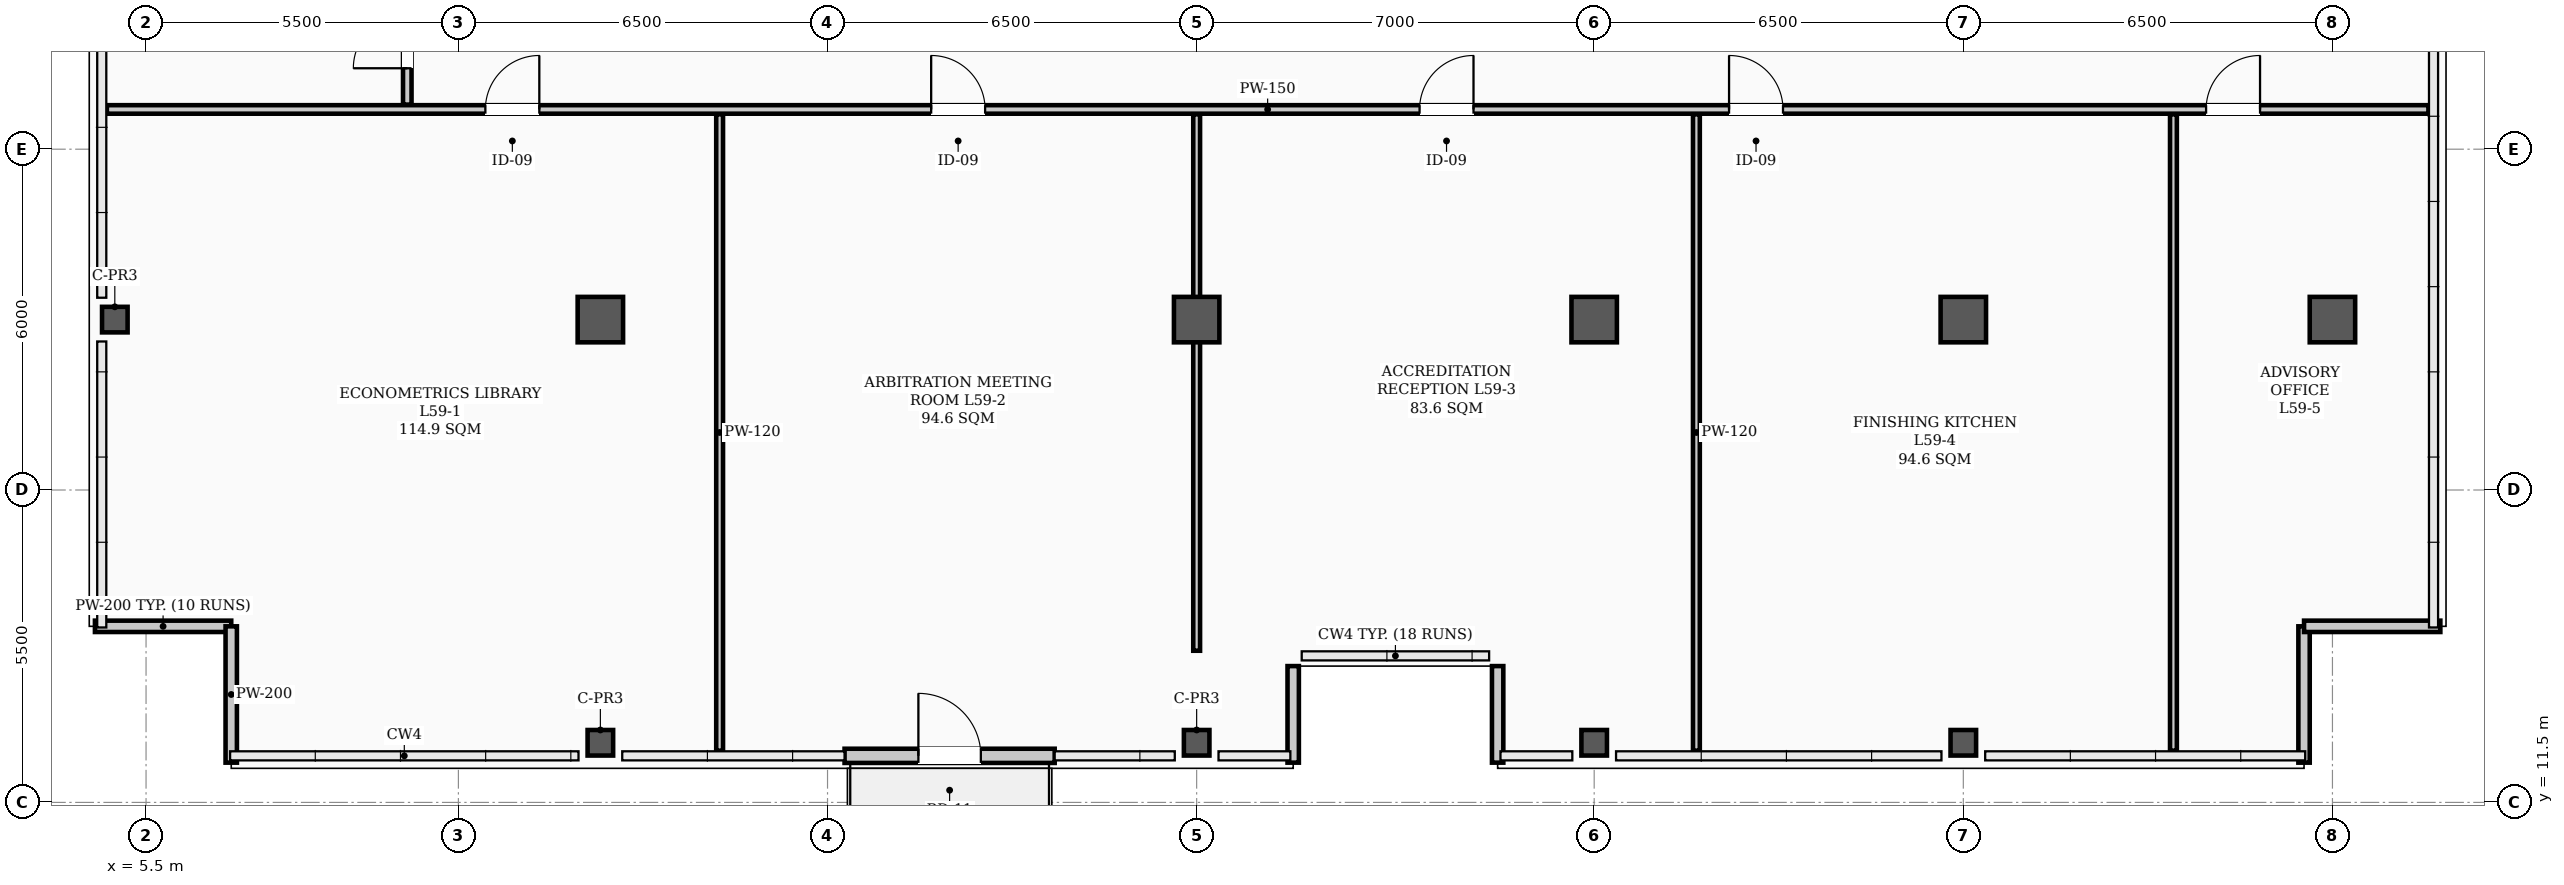
"""IFC4 building model, lengths in metres.
Left out: names, types, materials, properties, quantities, classifications, styles, units other than length and angle.
Written with IfcOpenShell. Run it as: python <this file> out.ifc"""

import sys

from ifc_helpers import new_model, si_unit, direction, frame, frame_2d, origin, origin_2d, place, context, subcontext, project, spatial, rectangle, hollow_rectangle, extrude, element, fill, save


model = new_model("IFC4")
c1 = context("Model", 3, precision=1e-05, world=origin(), true_north=direction((0.0, 1.0)))
c2 = subcontext(c1, "Body", "Model", "MODEL_VIEW")
j1 = project(units=[si_unit("LENGTHUNIT", "METRE"), si_unit("PLANEANGLEUNIT", "RADIAN")], contexts=[c1])
p1 = place(None, origin())
s1 = spatial("IfcSite", under=j1, at=p1, CompositionType="ELEMENT")
p2 = place(p1, origin())
s2 = spatial("IfcBuilding", under=s1, at=p2, CompositionType="ELEMENT")
p3 = place(p2, frame((0.0, 0.0, 238.4)))
s3 = spatial("IfcBuildingStorey", under=s2, at=p3, CompositionType="ELEMENT", Elevation=238.4)
for number, where, z_axis, x_axis in (
    (1, (13.5, 20.0, 0.0), (0.0, 0.0, 1.0), (1.0, 0.0, 0.0)),
    (2, (24.0, 20.0, 0.0), (0.0, 0.0, 1.0), (1.0, 0.0, 0.0)),
    (3, (31.0, 20.0, 0.0), (0.0, 0.0, 1.0), (1.0, 0.0, 0.0)),
    (4, (37.5, 20.0, 0.0), (0.0, 0.0, 1.0), (1.0, 0.0, 0.0)),
    (5, (44.0, 20.0, 0.0), (0.0, 0.0, 1.0), (1.0, 0.0, 0.0)),
):
    element("IfcColumn", number, at=place(p3, frame(where, z_axis=z_axis, x_axis=x_axis)), inside=s3, PredefinedType="COLUMN", context=c2, shape_type="SweptSolid", body=[
        extrude(hollow_rectangle(XDim=0.8, YDim=0.8, WallThickness=0.032, InnerFilletRadius=0.016, OuterFilletRadius=0.048, at=origin_2d()), origin(), (0.0, 0.0, 1.0), 3.9),
    ])
for number, where, z_axis, x_axis in (
    (6, (4.95, 20.0, 0.0), (0.0, 0.0, 1.0), (1.0, 0.0, 0.0)),
    (7, (13.5, 12.55, 0.0), (0.0, 0.0, 1.0), (1.0, 0.0, 0.0)),
    (8, (24.0, 12.55, 0.0), (0.0, 0.0, 1.0), (1.0, 0.0, 0.0)),
    (9, (31.0, 12.55, 0.0), (0.0, 0.0, 1.0), (1.0, 0.0, 0.0)),
    (10, (37.5, 12.55, 0.0), (0.0, 0.0, 1.0), (1.0, 0.0, 0.0)),
):
    element("IfcColumn", number, at=place(p3, frame(where, z_axis=z_axis, x_axis=x_axis)), inside=s3, PredefinedType="COLUMN", context=c2, shape_type="SweptSolid", body=[
        extrude(hollow_rectangle(XDim=0.45, YDim=0.45, WallThickness=0.022, InnerFilletRadius=0.022, OuterFilletRadius=0.044, at=origin_2d()), origin(), (0.0, 0.0, 1.0), 3.9),
    ])
p4 = place(p3, frame((4.6, 14.6, 0.0), z_axis=(0.0, 0.0, 1.0), x_axis=(1.0, 0.0, 0.0)))
e11 = element("IfcWall", 11, at=p4, inside=s3, PredefinedType="PARAPET", context=c2, shape_type="SweptSolid", body=[
    extrude(rectangle(XDim=2.4, YDim=0.2, at=frame_2d((1.2, 0.0))), origin(), (0.0, 0.0, 1.0), 1.2),
])
for number, where, z_axis, x_axis in (
    (12, (7.0, 14.6, 0.0), (0.0, 0.0, 1.0), (0.0, -1.0, 0.0)),
    (13, (43.5, 12.2, 0.0), (0.0, 0.0, 1.0), (0.0, 1.0, 0.0)),
):
    element("IfcWall", number, at=place(p3, frame(where, z_axis=z_axis, x_axis=x_axis)), inside=s3, PredefinedType="PARAPET", context=c2, shape_type="SweptSolid", body=[
        extrude(rectangle(XDim=2.4, YDim=0.2, at=frame_2d((1.2, 0.0))), origin(), (0.0, 0.0, 1.0), 1.2),
    ])
p5 = place(p3, frame((43.5, 14.6, 0.0), z_axis=(0.0, 0.0, 1.0), x_axis=(1.0, 0.0, 0.0)))
e14 = element("IfcWall", 14, at=p5, inside=s3, PredefinedType="PARAPET", context=c2, shape_type="SweptSolid", body=[
    extrude(rectangle(XDim=2.4, YDim=0.2, at=frame_2d((1.2, 0.0))), origin(), (0.0, 0.0, 1.0), 1.2),
])
for number, where, z_axis, x_axis in (
    (15, (25.7, 12.2, 0.0), (0.0, 0.0, 1.0), (0.0, 1.0, 0.0)),
    (16, (29.3, 13.9, 0.0), (0.0, 0.0, 1.0), (0.0, -1.0, 0.0)),
):
    element("IfcWall", number, at=place(p3, frame(where, z_axis=z_axis, x_axis=x_axis)), inside=s3, PredefinedType="PARAPET", context=c2, shape_type="SweptSolid", body=[
        extrude(rectangle(XDim=1.7, YDim=0.2, at=frame_2d((0.85, 0.0))), origin(), (0.0, 0.0, 1.0), 1.2),
    ])
p6 = place(p3, frame((17.8, 12.32, 0.0), z_axis=(0.0, 0.0, 1.0), x_axis=(1.0, 0.0, 0.0)))
e17 = element("IfcWall", 17, at=p6, inside=s3, PredefinedType="STANDARD", context=c2, shape_type="SweptSolid", body=[
    extrude(rectangle(XDim=3.7, YDim=0.25, at=frame_2d((1.85, 0.0))), origin(), (0.0, 0.0, 1.0), 3.18),
])
p7 = place(p6, frame((1.3, 0.0, 0.0)))
e18 = element("IfcOpeningElement", 18, at=p7, cuts=e17, PredefinedType="OPENING", context=c2, shape_type="SweptSolid", body=[
    extrude(rectangle(XDim=1.1, YDim=2.2, at=frame_2d((0.55, 1.1))), frame((0.0, 0.135, 0.0), z_axis=(0.0, -1.0, 0.0), x_axis=(1.0, 0.0, 0.0)), (0.0, 0.0, 1.0), 0.27),
])
p8 = place(p3, frame((4.81, 23.7, 0.0), z_axis=(0.0, 0.0, 1.0), x_axis=(1.0, 0.0, 0.0)))
e19 = element("IfcWall", 19, at=p8, inside=s3, PredefinedType="PARTITIONING", context=c2, shape_type="SweptSolid", body=[
    extrude(rectangle(XDim=40.88, YDim=0.15, at=frame_2d((20.44, 0.0))), origin(), (0.0, 0.0, 1.0), 3.2),
])
p9 = place(p8, frame((6.665, 0.0, 0.0)))
e20 = element("IfcOpeningElement", 20, at=p9, cuts=e19, PredefinedType="OPENING", context=c2, shape_type="SweptSolid", body=[
    extrude(rectangle(XDim=0.95, YDim=2.08, at=frame_2d((0.475, 1.04))), frame((0.0, 0.085, 0.0), z_axis=(0.0, -1.0, 0.0), x_axis=(1.0, 0.0, 0.0)), (0.0, 0.0, 1.0), 0.17),
])
p10 = place(p8, frame((14.515, 0.0, 0.0)))
e21 = element("IfcOpeningElement", 21, at=p10, cuts=e19, PredefinedType="OPENING", context=c2, shape_type="SweptSolid", body=[
    extrude(rectangle(XDim=0.95, YDim=2.08, at=frame_2d((0.475, 1.04))), frame((0.0, 0.085, 0.0), z_axis=(0.0, -1.0, 0.0), x_axis=(1.0, 0.0, 0.0)), (0.0, 0.0, 1.0), 0.17),
])
p11 = place(p8, frame((23.115, 0.0, 0.0)))
e22 = element("IfcOpeningElement", 22, at=p11, cuts=e19, PredefinedType="OPENING", context=c2, shape_type="SweptSolid", body=[
    extrude(rectangle(XDim=0.95, YDim=2.08, at=frame_2d((0.475, 1.04))), frame((0.0, 0.085, 0.0), z_axis=(0.0, -1.0, 0.0), x_axis=(1.0, 0.0, 0.0)), (0.0, 0.0, 1.0), 0.17),
])
p12 = place(p8, frame((28.565, 0.0, 0.0)))
e23 = element("IfcOpeningElement", 23, at=p12, cuts=e19, PredefinedType="OPENING", context=c2, shape_type="SweptSolid", body=[
    extrude(rectangle(XDim=0.95, YDim=2.08, at=frame_2d((0.475, 1.04))), frame((0.0, 0.085, 0.0), z_axis=(0.0, -1.0, 0.0), x_axis=(1.0, 0.0, 0.0)), (0.0, 0.0, 1.0), 0.17),
])
p13 = place(p8, frame((36.965, 0.0, 0.0)))
e24 = element("IfcOpeningElement", 24, at=p13, cuts=e19, PredefinedType="OPENING", context=c2, shape_type="SweptSolid", body=[
    extrude(rectangle(XDim=0.95, YDim=2.08, at=frame_2d((0.475, 1.04))), frame((0.0, 0.085, 0.0), z_axis=(0.0, -1.0, 0.0), x_axis=(1.0, 0.0, 0.0)), (0.0, 0.0, 1.0), 0.17),
])
p14 = place(p3, frame((10.1, 23.785, 0.0), z_axis=(0.0, 0.0, 1.0), x_axis=(0.0, 1.0, 0.0)))
e25 = element("IfcWall", 25, at=p14, inside=s3, PredefinedType="PARTITIONING", context=c2, shape_type="SweptSolid", body=[
    extrude(rectangle(XDim=12.28, YDim=0.15, at=frame_2d((6.14, 0.0))), origin(), (0.0, 0.0, 1.0), 3.1),
])
p15 = place(p14, frame((0.64, 0.0, 0.0)))
e26 = element("IfcOpeningElement", 26, at=p15, cuts=e25, PredefinedType="OPENING", context=c2, shape_type="SweptSolid", body=[
    extrude(rectangle(XDim=0.95, YDim=2.08, at=frame_2d((0.475, 1.04))), frame((0.0, 0.085, 0.0), z_axis=(0.0, -1.0, 0.0), x_axis=(1.0, 0.0, 0.0)), (0.0, 0.0, 1.0), 0.17),
])
p16 = place(p14, frame((9.815, 0.0, 0.0)))
e27 = element("IfcOpeningElement", 27, at=p16, cuts=e25, PredefinedType="OPENING", context=c2, shape_type="SweptSolid", body=[
    extrude(rectangle(XDim=0.95, YDim=2.08, at=frame_2d((0.475, 1.04))), frame((0.0, 0.085, 0.0), z_axis=(0.0, -1.0, 0.0), x_axis=(1.0, 0.0, 0.0)), (0.0, 0.0, 1.0), 0.17),
])
p17 = place(p3, frame((15.6, 12.41, 0.0), z_axis=(0.0, 0.0, 1.0), x_axis=(0.0, 1.0, 0.0)))
e28 = element("IfcWall", 28, at=p17, inside=s3, PredefinedType="PARTITIONING", context=c2, shape_type="SweptSolid", body=[
    extrude(rectangle(XDim=11.205, YDim=0.12, at=frame_2d((5.603, 0.0))), origin(), (0.0, 0.0, 1.0), 3.1),
])
p18 = place(p3, frame((24.0, 14.17, 0.0), z_axis=(0.0, 0.0, 1.0), x_axis=(0.0, 1.0, 0.0)))
e29 = element("IfcWall", 29, at=p18, inside=s3, PredefinedType="PARTITIONING", context=c2, shape_type="SweptSolid", body=[
    extrude(rectangle(XDim=9.445, YDim=0.12, at=frame_2d((4.723, 0.0))), origin(), (0.0, 0.0, 1.0), 3.1),
])
p19 = place(p3, frame((32.8, 12.41, 0.0), z_axis=(0.0, 0.0, 1.0), x_axis=(0.0, 1.0, 0.0)))
e30 = element("IfcWall", 30, at=p19, inside=s3, PredefinedType="PARTITIONING", context=c2, shape_type="SweptSolid", body=[
    extrude(rectangle(XDim=11.205, YDim=0.12, at=frame_2d((5.603, 0.0))), origin(), (0.0, 0.0, 1.0), 3.1),
])
p20 = place(p3, frame((41.2, 12.41, 0.0), z_axis=(0.0, 0.0, 1.0), x_axis=(0.0, 1.0, 0.0)))
e31 = element("IfcWall", 31, at=p20, inside=s3, PredefinedType="PARTITIONING", context=c2, shape_type="SweptSolid", body=[
    extrude(rectangle(XDim=11.205, YDim=0.12, at=frame_2d((5.603, 0.0))), origin(), (0.0, 0.0, 1.0), 3.72),
])
p21 = place(p7, origin())
e32 = element("IfcDoor", 32, at=p21, inside=s3, OperationType="SINGLE_SWING_LEFT", PredefinedType="DOOR", context=c2, shape_type="SweptSolid", body=[
    extrude(rectangle(XDim=1.1, YDim=2.2, at=frame_2d((0.55, 1.1))), frame((0.0, 0.025, 0.0), z_axis=(0.0, -1.0, 0.0), x_axis=(1.0, 0.0, 0.0)), (0.0, 0.0, 1.0), 0.05),
])
fill(e18, e32)
p22 = place(p9, origin())
e33 = element("IfcDoor", 33, at=p22, inside=s3, OperationType="SINGLE_SWING_RIGHT", PredefinedType="DOOR", context=c2, shape_type="SweptSolid", body=[
    extrude(rectangle(XDim=0.95, YDim=2.08, at=frame_2d((0.475, 1.04))), frame((0.0, 0.025, 0.0), z_axis=(0.0, -1.0, 0.0), x_axis=(1.0, 0.0, 0.0)), (0.0, 0.0, 1.0), 0.05),
])
fill(e20, e33)
p23 = place(p10, origin())
e34 = element("IfcDoor", 34, at=p23, inside=s3, OperationType="SINGLE_SWING_LEFT", PredefinedType="DOOR", context=c2, shape_type="SweptSolid", body=[
    extrude(rectangle(XDim=0.95, YDim=2.08, at=frame_2d((0.475, 1.04))), frame((0.0, 0.025, 0.0), z_axis=(0.0, -1.0, 0.0), x_axis=(1.0, 0.0, 0.0)), (0.0, 0.0, 1.0), 0.05),
])
fill(e21, e34)
p24 = place(p11, origin())
e35 = element("IfcDoor", 35, at=p24, inside=s3, OperationType="SINGLE_SWING_RIGHT", PredefinedType="DOOR", context=c2, shape_type="SweptSolid", body=[
    extrude(rectangle(XDim=0.95, YDim=2.08, at=frame_2d((0.475, 1.04))), frame((0.0, 0.025, 0.0), z_axis=(0.0, -1.0, 0.0), x_axis=(1.0, 0.0, 0.0)), (0.0, 0.0, 1.0), 0.05),
])
fill(e22, e35)
p25 = place(p12, origin())
e36 = element("IfcDoor", 36, at=p25, inside=s3, OperationType="SINGLE_SWING_LEFT", PredefinedType="DOOR", context=c2, shape_type="SweptSolid", body=[
    extrude(rectangle(XDim=0.95, YDim=2.08, at=frame_2d((0.475, 1.04))), frame((0.0, 0.025, 0.0), z_axis=(0.0, -1.0, 0.0), x_axis=(1.0, 0.0, 0.0)), (0.0, 0.0, 1.0), 0.05),
])
fill(e23, e36)
p26 = place(p13, origin())
e37 = element("IfcDoor", 37, at=p26, inside=s3, OperationType="SINGLE_SWING_RIGHT", PredefinedType="DOOR", context=c2, shape_type="SweptSolid", body=[
    extrude(rectangle(XDim=0.95, YDim=2.08, at=frame_2d((0.475, 1.04))), frame((0.0, 0.025, 0.0), z_axis=(0.0, -1.0, 0.0), x_axis=(1.0, 0.0, 0.0)), (0.0, 0.0, 1.0), 0.05),
])
fill(e24, e37)
p27 = place(p15, origin())
e38 = element("IfcDoor", 38, at=p27, inside=s3, OperationType="SINGLE_SWING_LEFT", PredefinedType="DOOR", context=c2, shape_type="SweptSolid", body=[
    extrude(rectangle(XDim=0.95, YDim=2.08, at=frame_2d((0.475, 1.04))), frame((0.0, 0.025, 0.0), z_axis=(0.0, -1.0, 0.0), x_axis=(1.0, 0.0, 0.0)), (0.0, 0.0, 1.0), 0.05),
])
fill(e26, e38)
save(model, sys.argv[1])
